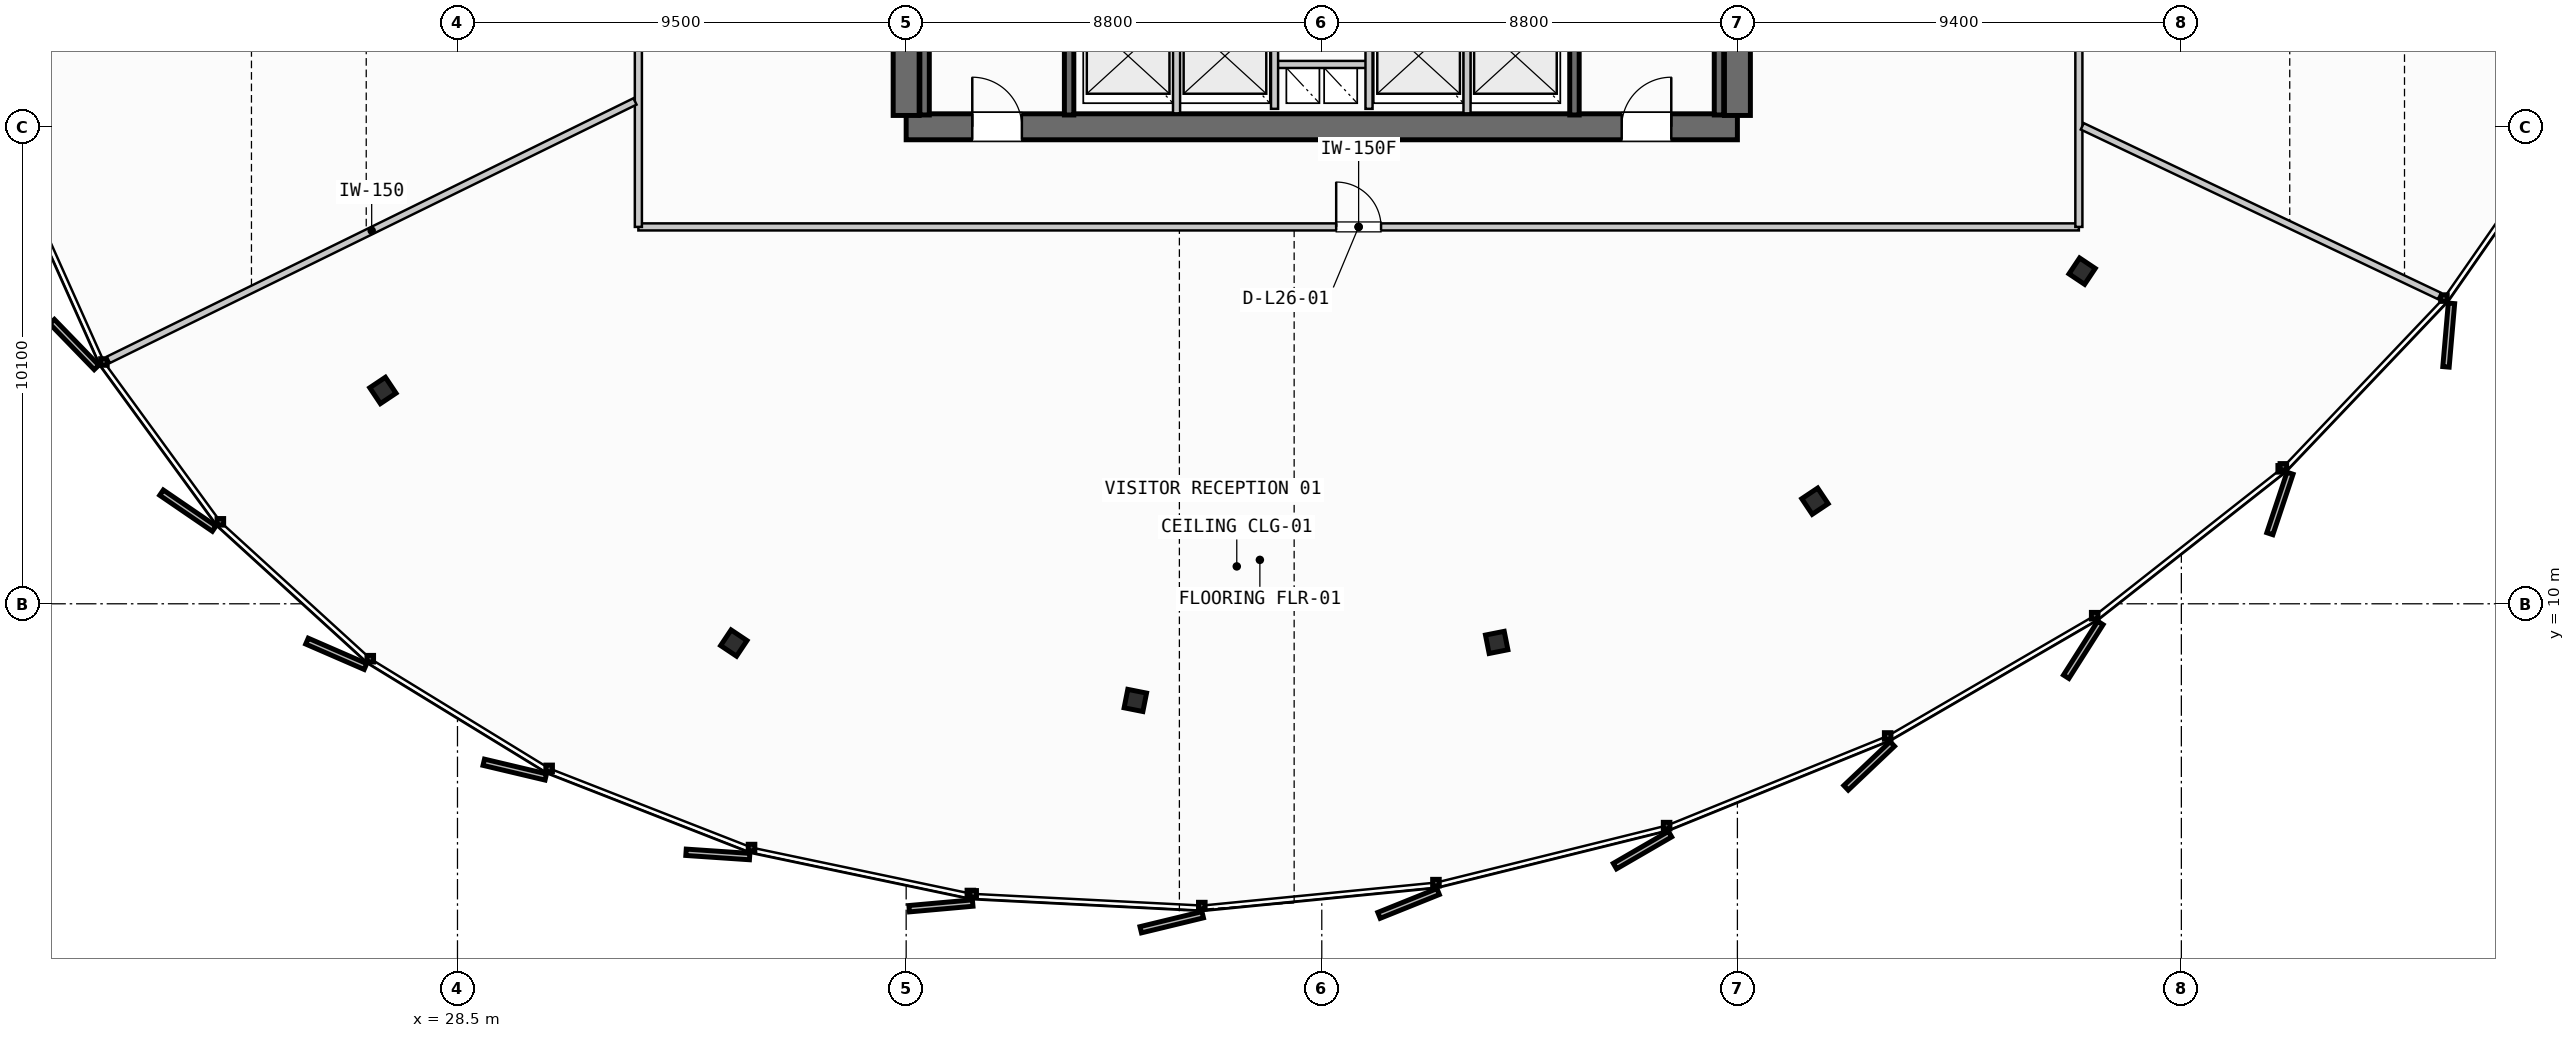
"""IFC4 building model, lengths in metres.
Left out: names, types, materials, properties, quantities, classifications, styles, units other than length and angle.
Written with IfcOpenShell. Run it as: python <this file> out.ifc"""

import sys

from ifc_helpers import new_model, si_unit, direction, frame, frame_2d, origin, origin_2d, place, context, subcontext, project, spatial, rectangle, i_section, extrude, source, transform, mapped, element, fill, save


model = new_model("IFC4")
c1 = context("Model", 3, precision=1e-05, world=origin(), true_north=direction((0.0, 1.0)))
c2 = subcontext(c1, "Body", "Model", "MODEL_VIEW")
j1 = project(units=[si_unit("LENGTHUNIT", "METRE"), si_unit("PLANEANGLEUNIT", "RADIAN")], contexts=[c1])
p1 = place(None, origin())
s1 = spatial("IfcSite", under=j1, at=p1, CompositionType="ELEMENT")
p2 = place(p1, origin())
s2 = spatial("IfcBuilding", under=s1, at=p2, CompositionType="ELEMENT")
p3 = place(p2, frame((0.0, 0.0, 107.2)))
s3 = spatial("IfcBuildingStorey", under=s2, at=p3, CompositionType="ELEMENT", Elevation=107.2)
p4 = place(p3, frame((38.0, 20.1, 0.0), z_axis=(0.0, 0.0, 1.0), x_axis=(1.0, 0.0, 0.0)))
e1 = element("IfcWall", 1, at=p4, inside=s3, PredefinedType="SHEAR", context=c2, shape_type="SweptSolid", body=[
    extrude(rectangle(XDim=17.6, YDim=0.55, at=frame_2d((8.8, 0.0))), origin(), (0.0, 0.0, 1.0), 3.35),
])
p5 = place(p4, frame((1.4, 0.0, 0.0)))
e2 = element("IfcOpeningElement", 2, at=p5, cuts=e1, PredefinedType="OPENING", context=c2, shape_type="SweptSolid", body=[
    extrude(rectangle(XDim=1.05, YDim=2.15, at=frame_2d((0.525, 1.075))), frame((0.0, 0.285, 0.0), z_axis=(0.0, -1.0, 0.0), x_axis=(1.0, 0.0, 0.0)), (0.0, 0.0, 1.0), 0.57),
])
p6 = place(p4, frame((15.15, 0.0, 0.0)))
e3 = element("IfcOpeningElement", 3, at=p6, cuts=e1, PredefinedType="OPENING", context=c2, shape_type="SweptSolid", body=[
    extrude(rectangle(XDim=1.05, YDim=2.15, at=frame_2d((0.525, 1.075))), frame((0.0, 0.285, 0.0), z_axis=(0.0, -1.0, 0.0), x_axis=(1.0, 0.0, 0.0)), (0.0, 0.0, 1.0), 0.57),
])
p7 = place(p3, frame((38.0, 35.26, 0.0), z_axis=(0.0, 0.0, 1.0), x_axis=(0.0, -1.0, 0.0)))
e4 = element("IfcWall", 4, at=p7, inside=s3, PredefinedType="SHEAR", context=c2, shape_type="SweptSolid", body=[
    extrude(rectangle(XDim=14.92, YDim=0.55, at=frame_2d((7.46, 0.0))), origin(), (0.0, 0.0, 1.0), 3.35),
])
p8 = place(p7, frame((5.21, 0.0, 0.0)))
e5 = element("IfcOpeningElement", 5, at=p8, cuts=e4, PredefinedType="OPENING", context=c2, shape_type="SweptSolid", body=[
    extrude(rectangle(XDim=1.1, YDim=2.2, at=frame_2d((0.55, 1.1))), frame((0.0, 0.285, 0.0), z_axis=(0.0, -1.0, 0.0), x_axis=(1.0, 0.0, 0.0)), (0.0, 0.0, 1.0), 0.57),
])
p9 = place(p3, frame((55.6, 20.34, 0.0), z_axis=(0.0, 0.0, 1.0), x_axis=(0.0, 1.0, 0.0)))
e6 = element("IfcWall", 6, at=p9, inside=s3, PredefinedType="SHEAR", context=c2, shape_type="SweptSolid", body=[
    extrude(rectangle(XDim=14.92, YDim=0.55, at=frame_2d((7.46, 0.0))), origin(), (0.0, 0.0, 1.0), 3.35),
])
p10 = place(p9, frame((12.71, 0.0, 0.0)))
e7 = element("IfcOpeningElement", 7, at=p10, cuts=e6, PredefinedType="OPENING", context=c2, shape_type="SweptSolid", body=[
    extrude(rectangle(XDim=1.05, YDim=2.15, at=frame_2d((0.525, 1.075))), frame((0.0, 0.285, 0.0), z_axis=(0.0, -1.0, 0.0), x_axis=(1.0, 0.0, 0.0)), (0.0, 0.0, 1.0), 0.57),
])
p11 = place(p9, frame((8.61, 0.0, 0.0)))
e8 = element("IfcOpeningElement", 8, at=p11, cuts=e6, PredefinedType="OPENING", context=c2, shape_type="SweptSolid", body=[
    extrude(rectangle(XDim=1.1, YDim=2.2, at=frame_2d((0.55, 1.1))), frame((0.0, 0.285, 0.0), z_axis=(0.0, -1.0, 0.0), x_axis=(1.0, 0.0, 0.0)), (0.0, 0.0, 1.0), 0.57),
])
m1 = source(origin(), c2, "Body", "SweptSolid", [
    extrude(i_section(OverallWidth=0.405, OverallDepth=0.398, WebThickness=0.035, FlangeThickness=0.056, FilletRadius=0.015, at=origin_2d()), origin(), (0.0, 0.0, 1.0), 3.35),
])
for number, where, z_axis, x_axis in (
    (9, (26.921, 14.517, 0.0), (0.0, 0.0, 1.0), (-0.831, -0.556, 0.0)),
    (10, (34.351, 9.168, 0.0), (0.0, 0.0, 1.0), (-0.556, -0.831, 0.0)),
    (11, (42.852, 7.954, 0.0), (0.0, 0.0, 1.0), (-0.195, -0.981, 0.0)),
    (12, (50.503, 9.182, 0.0), (0.0, 0.0, 1.0), (0.195, -0.981, 0.0)),
    (13, (57.242, 12.172, 0.0), (0.0, 0.0, 1.0), (0.556, -0.831, 0.0)),
    (14, (62.899, 17.043, 0.0), (0.0, 0.0, 1.0), (0.831, -0.556, 0.0)),
):
    element("IfcColumn", number, at=place(p3, frame(where, z_axis=z_axis, x_axis=x_axis)), inside=s3, PredefinedType="COLUMN", context=c2, shape_type="MappedRepresentation", body=[
        mapped(m1, transform((0.0, 0.0, 0.0), scale=1.0)),
    ])
for number, where, z_axis, x_axis in (
    (15, (41.45, 27.7, 0.0), (0.0, 0.0, 1.0), (0.0, -1.0, 0.0)),
    (16, (38.39, 20.35, 0.0), (0.0, 0.0, 1.0), (0.0, 1.0, 0.0)),
    (17, (55.21, 27.7, 0.0), (0.0, 0.0, 1.0), (0.0, -1.0, 0.0)),
    (18, (52.15, 20.35, 0.0), (0.0, 0.0, 1.0), (0.0, 1.0, 0.0)),
):
    element("IfcWall", number, at=place(p3, frame(where, z_axis=z_axis, x_axis=x_axis)), inside=s3, PredefinedType="SHEAR", context=c2, shape_type="SweptSolid", body=[
        extrude(rectangle(XDim=7.35, YDim=0.2, at=frame_2d((3.675, 0.0))), origin(), (0.0, 0.0, 1.0), 3.35),
    ])
p12 = place(p3, frame((45.8, 21.42, 0.0), z_axis=(0.0, 0.0, 1.0), x_axis=(1.0, 0.0, 0.0)))
e19 = element("IfcWall", 19, at=p12, inside=s3, PredefinedType="PARTITIONING", context=c2, shape_type="SweptSolid", body=[
    extrude(rectangle(XDim=2.0, YDim=0.15, at=frame_2d((1.0, 0.0))), origin(), (0.0, 0.0, 1.0), 2.28),
])
for number, where, z_axis, x_axis in (
    (20, (45.8, 20.48, 0.0), (0.0, 0.0, 1.0), (0.0, 1.0, 0.0)),
    (21, (47.8, 20.48, 0.0), (0.0, 0.0, 1.0), (0.0, 1.0, 0.0)),
):
    element("IfcWall", number, at=place(p3, frame(where, z_axis=z_axis, x_axis=x_axis)), inside=s3, PredefinedType="PARTITIONING", context=c2, shape_type="SweptSolid", body=[
        extrude(rectangle(XDim=2.24, YDim=0.15, at=frame_2d((1.12, 0.0))), origin(), (0.0, 0.0, 1.0), 2.28),
    ])
for number, where, z_axis, x_axis in (
    (22, (43.725, 20.385, 0.0), (0.0, 0.0, 1.0), (0.0, 1.0, 0.0)),
    (23, (49.875, 20.385, 0.0), (0.0, 0.0, 1.0), (0.0, 1.0, 0.0)),
):
    element("IfcWall", number, at=place(p3, frame(where, z_axis=z_axis, x_axis=x_axis)), inside=s3, PredefinedType="PARTITIONING", context=c2, shape_type="SweptSolid", body=[
        extrude(rectangle(XDim=2.345, YDim=0.15, at=frame_2d((1.172, 0.0))), origin(), (0.0, 0.0, 1.0), 2.28),
    ])
p13 = place(p3, frame((32.33, 17.98, 0.0), z_axis=(0.0, 0.0, 1.0), x_axis=(1.0, 0.0, 0.0)))
e24 = element("IfcWall", 24, at=p13, inside=s3, PredefinedType="PARTITIONING", context=c2, shape_type="SweptSolid", body=[
    extrude(rectangle(XDim=30.5, YDim=0.15, at=frame_2d((15.25, 0.0))), origin(), (0.0, 0.0, 1.0), 2.28),
])
p14 = place(p13, frame((14.775, 0.0, 0.0)))
e25 = element("IfcOpeningElement", 25, at=p14, cuts=e24, PredefinedType="OPENING", context=c2, shape_type="SweptSolid", body=[
    extrude(rectangle(XDim=0.95, YDim=2.15, at=frame_2d((0.475, 1.075))), frame((0.0, 0.085, 0.0), z_axis=(0.0, -1.0, 0.0), x_axis=(1.0, 0.0, 0.0)), (0.0, 0.0, 1.0), 0.17),
])
p15 = place(p3, frame((62.83, 17.98, 0.0), z_axis=(0.0, 0.0, 1.0), x_axis=(0.0, 1.0, 0.0)))
e26 = element("IfcWall", 26, at=p15, inside=s3, PredefinedType="PARTITIONING", context=c2, shape_type="SweptSolid", body=[
    extrude(rectangle(XDim=19.22, YDim=0.15, at=frame_2d((9.61, 0.0))), origin(), (0.0, 0.0, 1.0), 2.28),
])
p16 = place(p15, frame((4.606, 0.0, 0.0)))
e27 = element("IfcOpeningElement", 27, at=p16, cuts=e26, PredefinedType="OPENING", context=c2, shape_type="SweptSolid", body=[
    extrude(rectangle(XDim=0.95, YDim=2.15, at=frame_2d((0.475, 1.075))), frame((0.0, 0.085, 0.0), z_axis=(0.0, -1.0, 0.0), x_axis=(1.0, 0.0, 0.0)), (0.0, 0.0, 1.0), 0.17),
])
p17 = place(p15, frame((12.34, 0.0, 0.0)))
e28 = element("IfcOpeningElement", 28, at=p17, cuts=e26, PredefinedType="OPENING", context=c2, shape_type="SweptSolid", body=[
    extrude(rectangle(XDim=0.95, YDim=2.15, at=frame_2d((0.475, 1.075))), frame((0.0, 0.085, 0.0), z_axis=(0.0, -1.0, 0.0), x_axis=(1.0, 0.0, 0.0)), (0.0, 0.0, 1.0), 0.17),
])
p18 = place(p3, frame((32.33, 37.2, 0.0), z_axis=(0.0, 0.0, 1.0), x_axis=(0.0, -1.0, 0.0)))
e29 = element("IfcWall", 29, at=p18, inside=s3, PredefinedType="PARTITIONING", context=c2, shape_type="SweptSolid", body=[
    extrude(rectangle(XDim=19.22, YDim=0.15, at=frame_2d((9.61, 0.0))), origin(), (0.0, 0.0, 1.0), 2.28),
])
p19 = place(p18, frame((8.908, 0.0, 0.0)))
e30 = element("IfcOpeningElement", 30, at=p19, cuts=e29, PredefinedType="OPENING", context=c2, shape_type="SweptSolid", body=[
    extrude(rectangle(XDim=0.95, YDim=2.15, at=frame_2d((0.475, 1.075))), frame((0.0, 0.085, 0.0), z_axis=(0.0, -1.0, 0.0), x_axis=(1.0, 0.0, 0.0)), (0.0, 0.0, 1.0), 0.17),
])
p20 = place(p3, frame((32.258, 20.637, 0.0), z_axis=(0.0, 0.0, 1.0), x_axis=(-0.897759490266, -0.440485978933, 0.0)))
e31 = element("IfcWall", 31, at=p20, inside=s3, PredefinedType="PARTITIONING", context=c2, shape_type="SweptSolid", body=[
    extrude(rectangle(XDim=12.42, YDim=0.15, at=frame_2d((6.21, 0.0))), origin(), (0.0, 0.0, 1.0), 2.28),
])
p21 = place(p3, frame((62.902, 20.11, 0.0), z_axis=(0.0, 0.0, 1.0), x_axis=(0.903290218611, -0.429030046689, 0.0)))
e32 = element("IfcWall", 32, at=p21, inside=s3, PredefinedType="PARTITIONING", context=c2, shape_type="SweptSolid", body=[
    extrude(rectangle(XDim=8.372, YDim=0.15, at=frame_2d((4.186, 0.0))), origin(), (0.0, 0.0, 1.0), 2.28),
])
m2 = source(origin(), c2, "Body", "SweptSolid", [
    extrude(rectangle(XDim=1.05, YDim=2.15, at=frame_2d((0.525, 1.075))), frame((0.0, 0.025, 0.0), z_axis=(0.0, -1.0, 0.0), x_axis=(1.0, 0.0, 0.0)), (0.0, 0.0, 1.0), 0.05),
])
p22 = place(p5, origin())
e33 = element("IfcDoor", 33, at=p22, inside=s3, OperationType="SINGLE_SWING_LEFT", PredefinedType="DOOR", context=c2, shape_type="MappedRepresentation", body=[
    mapped(m2, transform((0.0, 0.0, 0.0), scale=1.0)),
])
fill(e2, e33)
p23 = place(p6, origin())
e34 = element("IfcDoor", 34, at=p23, inside=s3, OperationType="SINGLE_SWING_RIGHT", PredefinedType="DOOR", context=c2, shape_type="MappedRepresentation", body=[
    mapped(m2, transform((0.0, 0.0, 0.0), scale=1.0)),
])
fill(e3, e34)
m3 = source(origin(), c2, "Body", "SweptSolid", [
    extrude(rectangle(XDim=0.95, YDim=2.15, at=frame_2d((0.475, 1.075))), frame((0.0, 0.025, 0.0), z_axis=(0.0, -1.0, 0.0), x_axis=(1.0, 0.0, 0.0)), (0.0, 0.0, 1.0), 0.05),
])
p24 = place(p14, origin())
e35 = element("IfcDoor", 35, at=p24, inside=s3, OperationType="SINGLE_SWING_LEFT", PredefinedType="DOOR", context=c2, shape_type="MappedRepresentation", body=[
    mapped(m3, transform((0.0, 0.0, 0.0), scale=1.0)),
])
fill(e25, e35)
save(model, sys.argv[1])
